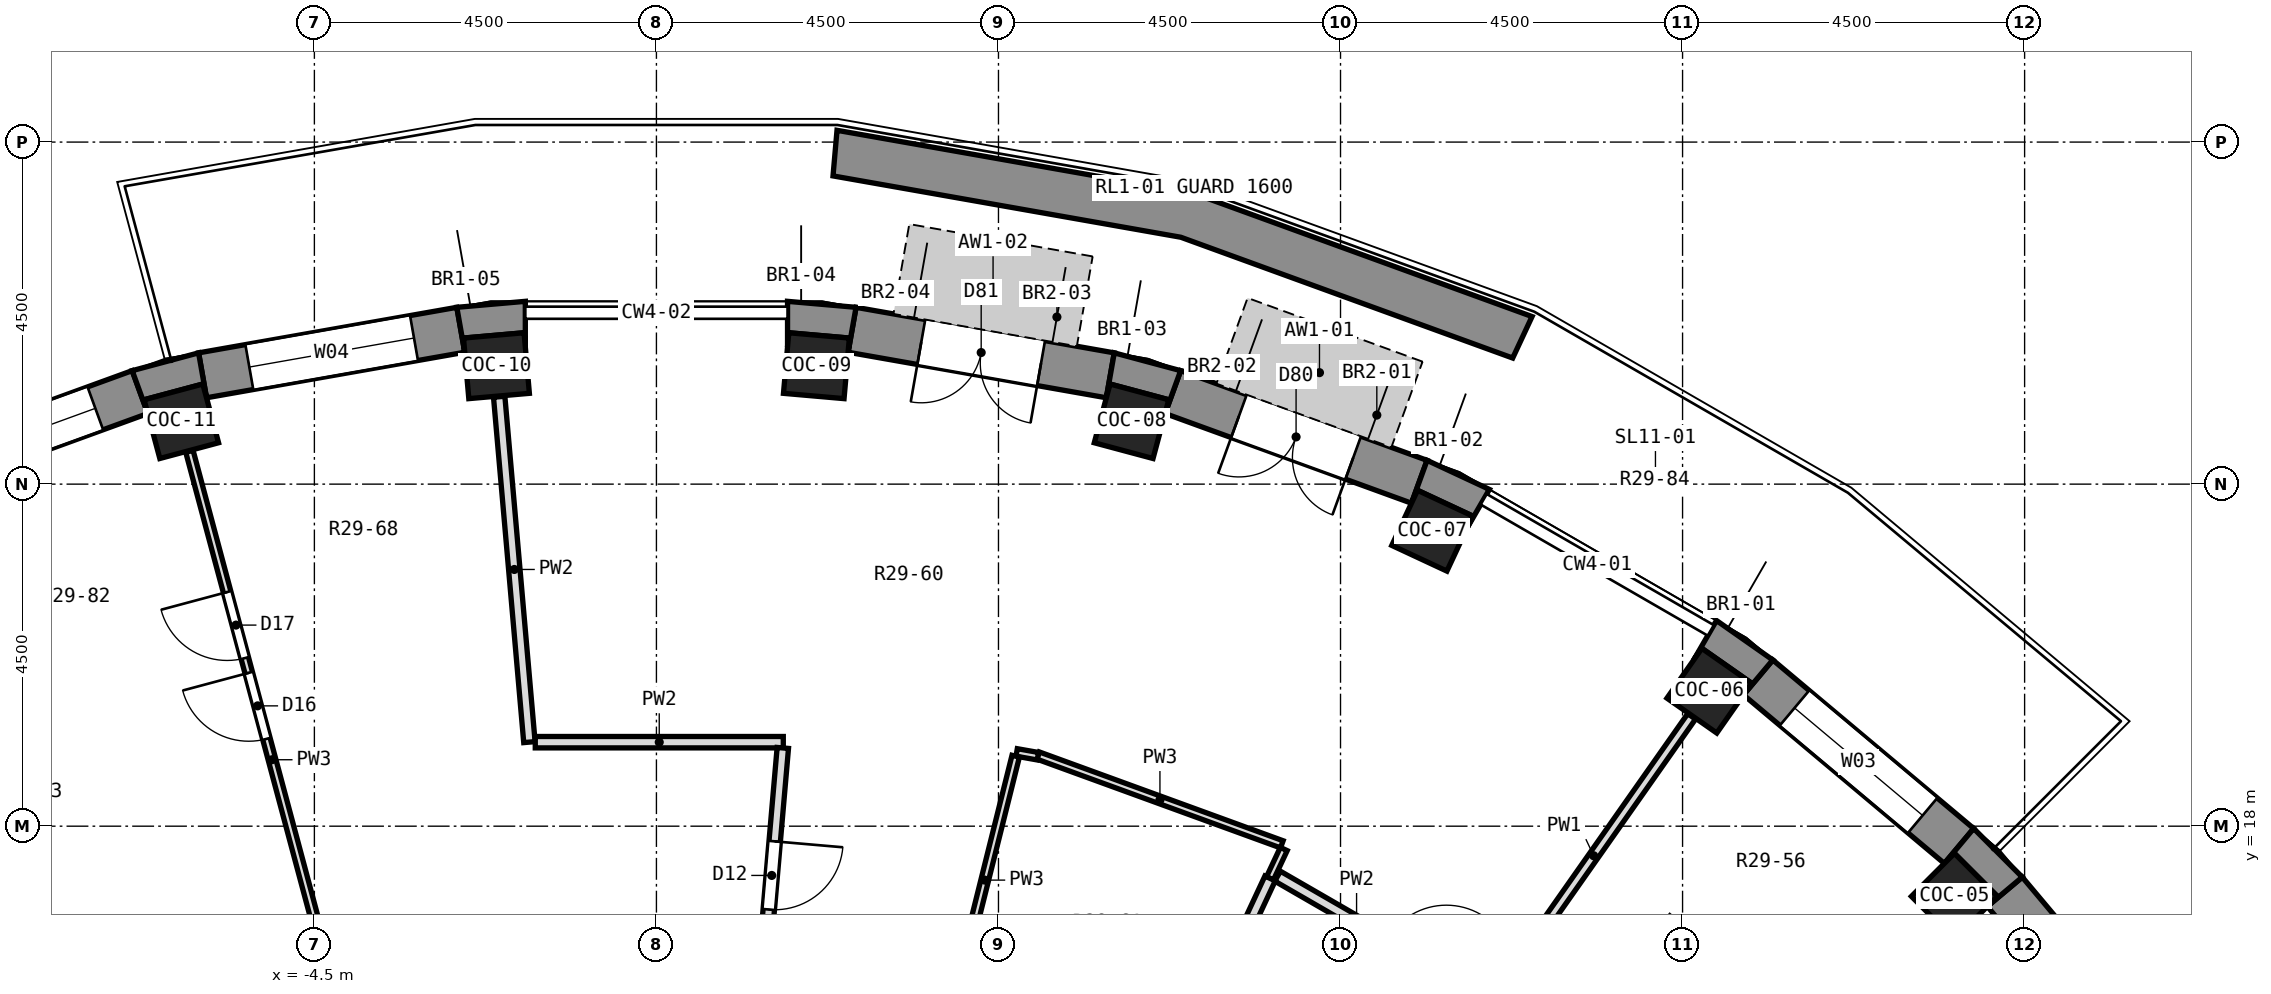
"""IFC4 building model, lengths in metres.
Left out: names, types, materials, properties, quantities, classifications, styles, units other than length and angle.
Written with IfcOpenShell. Run it as: python <this file> out.ifc"""

import sys

from ifc_helpers import new_model, si_unit, direction, frame, frame_2d, origin, origin_2d, place, context, subcontext, project, spatial, polyline, rectangle, outline, extrude, element, fill, save


model = new_model("IFC4")
c1 = context("Model", 3, precision=1e-05, world=origin(), true_north=direction((0.0, 1.0)))
c2 = subcontext(c1, "Body", "Model", "MODEL_VIEW")
j1 = project(units=[si_unit("LENGTHUNIT", "METRE"), si_unit("PLANEANGLEUNIT", "RADIAN")], contexts=[c1])
p1 = place(None, origin())
s1 = spatial("IfcSite", under=j1, at=p1, CompositionType="ELEMENT")
p2 = place(p1, origin())
s2 = spatial("IfcBuilding", under=s1, at=p2, CompositionType="ELEMENT")
p3 = place(p2, frame((0.0, 0.0, 200.4)))
s3 = spatial("IfcBuildingStorey", under=s2, at=p3, CompositionType="ELEMENT", Elevation=200.4)
for number, where, z_axis, x_axis in (
    (1, (17.077, 17.077, 0.0), (0.0, 0.0, 1.0), (0.707, 0.707, 0.0)),
    (2, (13.852, 19.782, 0.0), (0.0, 0.0, 1.0), (0.574, 0.819, 0.0)),
    (3, (10.206, 21.887, 0.0), (0.0, 0.0, 1.0), (0.423, 0.906, 0.0)),
    (4, (6.25, 23.327, 0.0), (0.0, 0.0, 1.0), (0.259, 0.966, 0.0)),
    (5, (2.105, 24.058, 0.0), (0.0, 0.0, 1.0), (0.087, 0.996, 0.0)),
    (6, (-2.105, 24.058, 0.0), (0.0, 0.0, 1.0), (-0.087, 0.996, 0.0)),
    (7, (-6.25, 23.327, 0.0), (0.0, 0.0, 1.0), (-0.259, 0.966, 0.0)),
):
    element("IfcColumn", number, at=place(p3, frame(where, z_axis=z_axis, x_axis=x_axis)), inside=s3, PredefinedType="COLUMN", context=c2, shape_type="SweptSolid", body=[
        extrude(rectangle(XDim=0.8, YDim=0.8, at=origin_2d()), origin(), (0.0, 0.0, 1.0), 3.3),
    ])
p4 = place(p3, frame((19.957, 14.494, 0.0), z_axis=(0.0, 0.0, 1.0), x_axis=(-0.642770398358, 0.766058884809, 0.0)))
e8 = element("IfcWall", 8, at=p4, inside=s3, PredefinedType="SOLIDWALL", context=c2, shape_type="SweptSolid", body=[
    extrude(rectangle(XDim=3.449, YDim=0.6, at=frame_2d((1.725, 0.0))), origin(), (0.0, 0.0, 1.0), 2.85),
])
p5 = place(p4, frame((0.625, 0.0, 0.9)))
e9 = element("IfcOpeningElement", 9, at=p5, cuts=e8, PredefinedType="OPENING", context=c2, shape_type="SweptSolid", body=[
    extrude(rectangle(XDim=2.2, YDim=1.8, at=frame_2d((1.1, 0.9))), frame((0.0, 0.312, 0.0), z_axis=(0.0, -1.0, 0.0), x_axis=(1.0, 0.0, 0.0)), (0.0, 0.0, 1.0), 0.624),
])
p6 = place(p3, frame((17.137, 17.74, 0.0), z_axis=(0.0, 0.0, 1.0), x_axis=(-0.766058884809, 0.642770398358, 0.0)))
e10 = element("IfcWall", 10, at=p6, inside=s3, PredefinedType="SOLIDWALL", context=c2, shape_type="SweptSolid", body=[
    extrude(rectangle(XDim=3.449, YDim=0.6, at=frame_2d((1.725, 0.0))), origin(), (0.0, 0.0, 1.0), 2.85),
])
p7 = place(p6, frame((0.625, 0.0, 0.9)))
e11 = element("IfcOpeningElement", 11, at=p7, cuts=e10, PredefinedType="OPENING", context=c2, shape_type="SweptSolid", body=[
    extrude(rectangle(XDim=2.2, YDim=1.8, at=frame_2d((1.1, 0.9))), frame((0.0, 0.312, 0.0), z_axis=(0.0, -1.0, 0.0), x_axis=(1.0, 0.0, 0.0)), (0.0, 0.0, 1.0), 0.624),
])
p8 = place(p3, frame((10.036, 22.531, 0.0), z_axis=(0.0, 0.0, 1.0), x_axis=(-0.93968799822, 0.342032843455, 0.0)))
e12 = element("IfcWall", 12, at=p8, inside=s3, PredefinedType="SOLIDWALL", context=c2, shape_type="SweptSolid", body=[
    extrude(rectangle(XDim=3.45, YDim=0.6, at=frame_2d((1.725, 0.0))), origin(), (0.0, 0.0, 1.0), 2.85),
])
p9 = place(p8, frame((0.925, 0.0, 0.0)))
e13 = element("IfcOpeningElement", 13, at=p9, cuts=e12, PredefinedType="OPENING", context=c2, shape_type="SweptSolid", body=[
    extrude(rectangle(XDim=1.6, YDim=2.4, at=frame_2d((0.8, 1.2))), frame((0.0, 0.312, 0.0), z_axis=(0.0, -1.0, 0.0), x_axis=(1.0, 0.0, 0.0)), (0.0, 0.0, 1.0), 0.624),
])
p10 = place(p3, frame((5.971, 23.932, 0.0), z_axis=(0.0, 0.0, 1.0), x_axis=(-0.984814892183, 0.173607684551, 0.0)))
e14 = element("IfcWall", 14, at=p10, inside=s3, PredefinedType="SOLIDWALL", context=c2, shape_type="SweptSolid", body=[
    extrude(rectangle(XDim=3.45, YDim=0.6, at=frame_2d((1.725, 0.0))), origin(), (0.0, 0.0, 1.0), 2.85),
])
p11 = place(p10, frame((0.925, 0.0, 0.0)))
e15 = element("IfcOpeningElement", 15, at=p11, cuts=e14, PredefinedType="OPENING", context=c2, shape_type="SweptSolid", body=[
    extrude(rectangle(XDim=1.6, YDim=2.4, at=frame_2d((0.8, 1.2))), frame((0.0, 0.312, 0.0), z_axis=(0.0, -1.0, 0.0), x_axis=(1.0, 0.0, 0.0)), (0.0, 0.0, 1.0), 0.624),
])
p12 = place(p3, frame((-2.574, 24.531, 0.0), z_axis=(0.0, 0.0, 1.0), x_axis=(-0.984814892183, -0.173607684551, 0.0)))
e16 = element("IfcWall", 16, at=p12, inside=s3, PredefinedType="SOLIDWALL", context=c2, shape_type="SweptSolid", body=[
    extrude(rectangle(XDim=3.45, YDim=0.6, at=frame_2d((1.725, 0.0))), origin(), (0.0, 0.0, 1.0), 2.85),
])
p13 = place(p12, frame((0.625, 0.0, 0.9)))
e17 = element("IfcOpeningElement", 17, at=p13, cuts=e16, PredefinedType="OPENING", context=c2, shape_type="SweptSolid", body=[
    extrude(rectangle(XDim=2.2, YDim=1.8, at=frame_2d((1.1, 0.9))), frame((0.0, 0.312, 0.0), z_axis=(0.0, -1.0, 0.0), x_axis=(1.0, 0.0, 0.0)), (0.0, 0.0, 1.0), 0.624),
])
p14 = place(p3, frame((-6.794, 23.711, 0.0), z_axis=(0.0, 0.0, 1.0), x_axis=(-0.93968799822, -0.342032843455, 0.0)))
e18 = element("IfcWall", 18, at=p14, inside=s3, PredefinedType="SOLIDWALL", context=c2, shape_type="SweptSolid", body=[
    extrude(rectangle(XDim=3.45, YDim=0.6, at=frame_2d((1.725, 0.0))), origin(), (0.0, 0.0, 1.0), 2.85),
])
p15 = place(p14, frame((0.625, 0.0, 0.9)))
e19 = element("IfcOpeningElement", 19, at=p15, cuts=e18, PredefinedType="OPENING", context=c2, shape_type="SweptSolid", body=[
    extrude(rectangle(XDim=2.2, YDim=1.8, at=frame_2d((1.1, 0.9))), frame((0.0, 0.312, 0.0), z_axis=(0.0, -1.0, 0.0), x_axis=(1.0, 0.0, 0.0)), (0.0, 0.0, 1.0), 0.624),
])
p16 = place(p3, origin())
e20 = element("IfcWall", 20, at=p16, inside=s3, PredefinedType="SOLIDWALL", context=c2, shape_type="SweptSolid", body=[
    extrude(outline(polyline([(17.33, 17.969), (16.944, 17.51), (17.077, 17.642), (17.642, 17.077), (17.51, 16.944), (17.969, 17.33), (17.33, 17.969)])), origin(), (0.0, 0.0, 1.0), 2.85),
])
p17 = place(p3, origin())
e21 = element("IfcWall", 21, at=p17, inside=s3, PredefinedType="SOLIDWALL", context=c2, shape_type="SweptSolid", body=[
    extrude(outline(polyline([(14.687, 20.187), (13.946, 20.706), (13.646, 20.186), (13.754, 20.34), (14.409, 19.881), (14.302, 19.727), (14.687, 20.187)])), origin(), (0.0, 0.0, 1.0), 2.85),
])
p18 = place(p3, origin())
e22 = element("IfcWall", 22, at=p18, inside=s3, PredefinedType="SOLIDWALL", context=c2, shape_type="SweptSolid", body=[
    extrude(outline(polyline([(10.139, 22.813), (9.934, 22.249), (10.013, 22.419), (10.738, 22.081), (10.659, 21.911), (10.959, 22.431), (10.139, 22.813)])), origin(), (0.0, 0.0, 1.0), 2.85),
])
p19 = place(p3, origin())
e23 = element("IfcWall", 23, at=p19, inside=s3, PredefinedType="SOLIDWALL", context=c2, shape_type="SweptSolid", body=[
    extrude(outline(polyline([(6.023, 24.227), (5.919, 23.636), (5.968, 23.817), (6.74, 23.61), (6.692, 23.429), (6.897, 23.993), (6.023, 24.227)])), origin(), (0.0, 0.0, 1.0), 2.85),
])
p20 = place(p3, origin())
e24 = element("IfcWall", 24, at=p20, inside=s3, PredefinedType="SOLIDWALL", context=c2, shape_type="SweptSolid", body=[
    extrude(outline(polyline([(2.626, 24.826), (1.725, 24.905), (1.725, 24.305), (1.741, 24.491), (2.538, 24.422), (2.522, 24.235), (2.626, 24.826)])), origin(), (0.0, 0.0, 1.0), 2.85),
])
p21 = place(p3, origin())
e25 = element("IfcWall", 25, at=p21, inside=s3, PredefinedType="SOLIDWALL", context=c2, shape_type="SweptSolid", body=[
    extrude(outline(polyline([(-1.725, 24.905), (-2.626, 24.826), (-2.522, 24.235), (-2.538, 24.422), (-1.741, 24.491), (-1.725, 24.305), (-1.725, 24.905)])), origin(), (0.0, 0.0, 1.0), 2.85),
])
p22 = place(p3, origin())
e26 = element("IfcWall", 26, at=p22, inside=s3, PredefinedType="SOLIDWALL", context=c2, shape_type="SweptSolid", body=[
    extrude(outline(polyline([(-6.023, 24.227), (-6.897, 23.993), (-6.692, 23.429), (-6.74, 23.61), (-5.968, 23.817), (-5.919, 23.636), (-6.023, 24.227)])), origin(), (0.0, 0.0, 1.0), 2.85),
])
p23 = place(p3, origin())
e27 = element("IfcWall", 27, at=p23, inside=s3, PredefinedType="PARAPET", context=c2, shape_type="SweptSolid", body=[
    extrude(outline(polyline([(11.52, 24.705), (7.055, 26.33), (2.376, 27.155), (2.323, 26.555), (6.899, 25.748), (11.265, 24.159), (11.52, 24.705)])), origin(), (0.0, 0.0, 1.0), 0.5),
])
p24 = place(p3, frame((-2.069, 23.65, 0.0), z_axis=(0.0, 0.0, 1.0), x_axis=(0.087195502411, -0.996191218772, 0.0)))
e28 = element("IfcWall", 28, at=p24, inside=s3, PredefinedType="PARTITIONING", context=c2, shape_type="SweptSolid", body=[
    extrude(rectangle(XDim=4.561, YDim=0.15, at=frame_2d((2.281, 0.0))), origin(), (0.0, 0.0, 1.0), 2.85),
])
p25 = place(p3, frame((-6.144, 22.931, 0.0), z_axis=(0.0, 0.0, 1.0), x_axis=(0.258789681819, -0.965933693679, 0.0)))
e29 = element("IfcWall", 29, at=p25, inside=s3, PredefinedType="PARTITIONING", context=c2, shape_type="SweptSolid", body=[
    extrude(rectangle(XDim=7.59, YDim=0.1, at=frame_2d((3.795, 0.0))), origin(), (0.0, 0.0, 1.0), 2.85),
])
p26 = place(p25, frame((3.016, 0.0, 0.0)))
e30 = element("IfcOpeningElement", 30, at=p26, cuts=e29, PredefinedType="OPENING", context=c2, shape_type="SweptSolid", body=[
    extrude(rectangle(XDim=0.9, YDim=2.1, at=frame_2d((0.45, 1.05))), frame((0.0, 0.062, 0.0), z_axis=(0.0, -1.0, 0.0), x_axis=(1.0, 0.0, 0.0)), (0.0, 0.0, 1.0), 0.124),
])
p27 = place(p25, frame((1.916, 0.0, 0.0)))
e31 = element("IfcOpeningElement", 31, at=p27, cuts=e29, PredefinedType="OPENING", context=c2, shape_type="SweptSolid", body=[
    extrude(rectangle(XDim=0.9, YDim=2.1, at=frame_2d((0.45, 1.05))), frame((0.0, 0.062, 0.0), z_axis=(0.0, -1.0, 0.0), x_axis=(1.0, 0.0, 0.0)), (0.0, 0.0, 1.0), 0.124),
])
p28 = place(p3, frame((8.172, 17.342, 0.0), z_axis=(0.0, 0.0, 1.0), x_axis=(0.866086584464, -0.499894016979, 0.0)))
e32 = element("IfcWall", 32, at=p28, inside=s3, PredefinedType="PARTITIONING", context=c2, shape_type="SweptSolid", body=[
    extrude(rectangle(XDim=3.203, YDim=0.15, at=frame_2d((1.602, 0.0))), origin(), (0.0, 0.0, 1.0), 2.85),
])
p29 = place(p28, frame((1.664, 0.0, 0.0)))
e33 = element("IfcOpeningElement", 33, at=p29, cuts=e32, PredefinedType="OPENING", context=c2, shape_type="SweptSolid", body=[
    extrude(rectangle(XDim=0.9, YDim=2.1, at=frame_2d((0.45, 1.05))), frame((0.0, 0.087, 0.0), z_axis=(0.0, -1.0, 0.0), x_axis=(1.0, 0.0, 0.0)), (0.0, 0.0, 1.0), 0.174),
])
p30 = place(p3, frame((5.02, 18.93, 0.0), z_axis=(0.0, 0.0, 1.0), x_axis=(0.939619985891, -0.342219640165, 0.0)))
e34 = element("IfcWall", 34, at=p30, inside=s3, PredefinedType="PARTITIONING", context=c2, shape_type="SweptSolid", body=[
    extrude(rectangle(XDim=3.414, YDim=0.1, at=frame_2d((1.707, 0.0))), origin(), (0.0, 0.0, 1.0), 2.85),
])
p31 = place(p3, frame((4.739, 18.97, 0.0), z_axis=(0.0, 0.0, 1.0), x_axis=(0.984670903861, -0.174422507403, 0.0)))
e35 = element("IfcWall", 35, at=p31, inside=s3, PredefinedType="PARTITIONING", context=c2, shape_type="SweptSolid", body=[
    extrude(rectangle(XDim=0.284, YDim=0.1, at=frame_2d((0.142, 0.0))), origin(), (0.0, 0.0, 1.0), 2.85),
])
p32 = place(p3, frame((-1.594, 19.105, 0.0), z_axis=(0.0, 0.0, 1.0), x_axis=(1.0, 0.0, 0.0)))
e36 = element("IfcWall", 36, at=p32, inside=s3, PredefinedType="PARTITIONING", context=c2, shape_type="SweptSolid", body=[
    extrude(rectangle(XDim=3.263, YDim=0.15, at=frame_2d((1.631, 0.0))), origin(), (0.0, 0.0, 1.0), 2.85),
])
p33 = place(p3, frame((11.042, 15.777, 0.0), z_axis=(0.0, 0.0, 1.0), x_axis=(0.574967193178, 0.818176464321, 0.0)))
e37 = element("IfcWall", 37, at=p33, inside=s3, PredefinedType="PARTITIONING", context=c2, shape_type="SweptSolid", body=[
    extrude(rectangle(XDim=4.483, YDim=0.125, at=frame_2d((2.242, 0.0))), origin(), (0.0, 0.0, 1.0), 2.85),
])
p34 = place(p3, frame((8.072, 17.314, 0.0), z_axis=(0.0, 0.0, 1.0), x_axis=(0.424639138258, 0.905362691003, 0.0)))
e38 = element("IfcWall", 38, at=p34, inside=s3, PredefinedType="PARTITIONING", context=c2, shape_type="SweptSolid", body=[
    extrude(rectangle(XDim=0.427, YDim=0.1, at=frame_2d((0.213, 0.0))), origin(), (0.0, 0.0, 1.0), 2.85),
])
p35 = place(p3, frame((6.645, 14.249, 0.0), z_axis=(0.0, 0.0, 1.0), x_axis=(0.422581046751, 0.906325139741, 0.0)))
e39 = element("IfcWall", 39, at=p35, inside=s3, PredefinedType="PARTITIONING", context=c2, shape_type="SweptSolid", body=[
    extrude(rectangle(XDim=3.381, YDim=0.15, at=frame_2d((1.69, 0.0))), origin(), (0.0, 0.0, 1.0), 2.85),
])
p36 = place(p3, frame((3.912, 15.661, 0.0), z_axis=(0.0, 0.0, 1.0), x_axis=(0.24239884799, 0.970176684163, 0.0)))
e40 = element("IfcWall", 40, at=p36, inside=s3, PredefinedType="PARTITIONING", context=c2, shape_type="SweptSolid", body=[
    extrude(rectangle(XDim=3.36, YDim=0.1, at=frame_2d((1.68, 0.0))), origin(), (0.0, 0.0, 1.0), 2.85),
])
p37 = place(p3, frame((1.37, 15.662, 0.0), z_axis=(0.0, 0.0, 1.0), x_axis=(0.086536105046, 0.996248715193, 0.0)))
e41 = element("IfcWall", 41, at=p37, inside=s3, PredefinedType="PARTITIONING", context=c2, shape_type="SweptSolid", body=[
    extrude(rectangle(XDim=3.38, YDim=0.15, at=frame_2d((1.69, 0.0))), origin(), (0.0, 0.0, 1.0), 2.85),
])
p38 = place(p37, frame((1.246, 0.0, 0.0)))
e42 = element("IfcOpeningElement", 42, at=p38, cuts=e41, PredefinedType="OPENING", context=c2, shape_type="SweptSolid", body=[
    extrude(rectangle(XDim=0.9, YDim=2.1, at=frame_2d((0.45, 1.05))), frame((0.0, 0.087, 0.0), z_axis=(0.0, -1.0, 0.0), x_axis=(1.0, 0.0, 0.0)), (0.0, 0.0, 1.0), 0.174),
])
p39 = place(p7, origin())
e43 = element("IfcWindow", 43, at=p39, inside=s3, PartitioningType="SINGLE_PANEL", PredefinedType="WINDOW", context=c2, shape_type="SweptSolid", body=[
    extrude(rectangle(XDim=2.2, YDim=1.8, at=frame_2d((1.1, 0.9))), frame((0.0, 0.18, 0.0), z_axis=(0.0, -1.0, 0.0), x_axis=(1.0, 0.0, 0.0)), (0.0, 0.0, 1.0), 0.06),
])
fill(e11, e43)
p40 = place(p9, origin())
e44 = element("IfcDoor", 44, at=p40, inside=s3, OperationType="DOUBLE_DOOR_SINGLE_SWING", PredefinedType="DOOR", context=c2, shape_type="SweptSolid", body=[
    extrude(rectangle(XDim=1.6, YDim=2.4, at=frame_2d((0.8, 1.2))), frame((0.0, 0.125, 0.0), z_axis=(0.0, -1.0, 0.0), x_axis=(1.0, 0.0, 0.0)), (0.0, 0.0, 1.0), 0.05),
])
fill(e13, e44)
p41 = place(p11, origin())
e45 = element("IfcDoor", 45, at=p41, inside=s3, OperationType="DOUBLE_DOOR_SINGLE_SWING", PredefinedType="DOOR", context=c2, shape_type="SweptSolid", body=[
    extrude(rectangle(XDim=1.6, YDim=2.4, at=frame_2d((0.8, 1.2))), frame((0.0, 0.125, 0.0), z_axis=(0.0, -1.0, 0.0), x_axis=(1.0, 0.0, 0.0)), (0.0, 0.0, 1.0), 0.05),
])
fill(e15, e45)
p42 = place(p13, origin())
e46 = element("IfcWindow", 46, at=p42, inside=s3, PartitioningType="SINGLE_PANEL", PredefinedType="WINDOW", context=c2, shape_type="SweptSolid", body=[
    extrude(rectangle(XDim=2.2, YDim=1.8, at=frame_2d((1.1, 0.9))), frame((0.0, 0.18, 0.0), z_axis=(0.0, -1.0, 0.0), x_axis=(1.0, 0.0, 0.0)), (0.0, 0.0, 1.0), 0.06),
])
fill(e17, e46)
p43 = place(p15, origin())
e47 = element("IfcWindow", 47, at=p43, inside=s3, PartitioningType="SINGLE_PANEL", PredefinedType="WINDOW", context=c2, shape_type="SweptSolid", body=[
    extrude(rectangle(XDim=2.2, YDim=1.8, at=frame_2d((1.1, 0.9))), frame((0.0, 0.18, 0.0), z_axis=(0.0, -1.0, 0.0), x_axis=(1.0, 0.0, 0.0)), (0.0, 0.0, 1.0), 0.06),
])
fill(e19, e47)
p44 = place(p38, frame((0.9, 0.0, 0.0), z_axis=(0.0, 0.0, 1.0), x_axis=(-1.0, 0.0, 0.0)))
e48 = element("IfcDoor", 48, at=p44, inside=s3, OperationType="SINGLE_SWING_LEFT", PredefinedType="DOOR", context=c2, shape_type="SweptSolid", body=[
    extrude(rectangle(XDim=0.9, YDim=2.1, at=frame_2d((0.45, 1.05))), frame((0.0, 0.025, 0.0), z_axis=(0.0, -1.0, 0.0), x_axis=(1.0, 0.0, 0.0)), (0.0, 0.0, 1.0), 0.05),
])
fill(e42, e48)
p45 = place(p26, frame((0.9, 0.0, 0.0), z_axis=(0.0, 0.0, 1.0), x_axis=(-1.0, 0.0, 0.0)))
e49 = element("IfcDoor", 49, at=p45, inside=s3, OperationType="SINGLE_SWING_RIGHT", PredefinedType="DOOR", context=c2, shape_type="SweptSolid", body=[
    extrude(rectangle(XDim=0.9, YDim=2.1, at=frame_2d((0.45, 1.05))), frame((0.0, 0.025, 0.0), z_axis=(0.0, -1.0, 0.0), x_axis=(1.0, 0.0, 0.0)), (0.0, 0.0, 1.0), 0.05),
])
fill(e30, e49)
p46 = place(p27, frame((0.9, 0.0, 0.0), z_axis=(0.0, 0.0, 1.0), x_axis=(-1.0, 0.0, 0.0)))
e50 = element("IfcDoor", 50, at=p46, inside=s3, OperationType="SINGLE_SWING_RIGHT", PredefinedType="DOOR", context=c2, shape_type="SweptSolid", body=[
    extrude(rectangle(XDim=0.9, YDim=2.1, at=frame_2d((0.45, 1.05))), frame((0.0, 0.025, 0.0), z_axis=(0.0, -1.0, 0.0), x_axis=(1.0, 0.0, 0.0)), (0.0, 0.0, 1.0), 0.05),
])
fill(e31, e50)
save(model, sys.argv[1])
